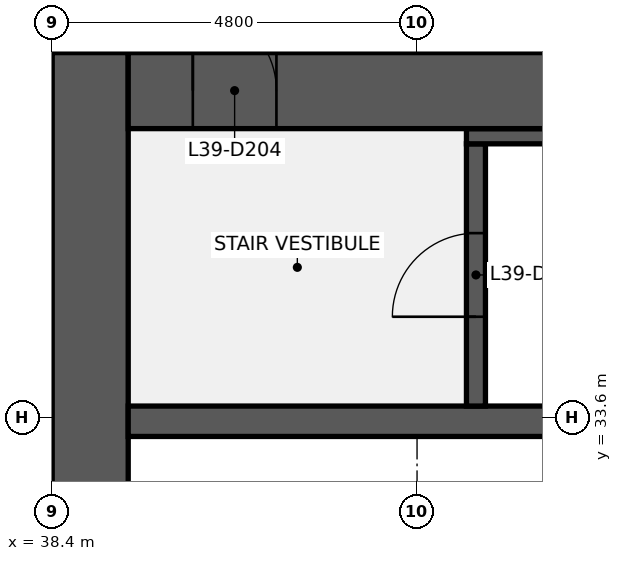
"""IFC4 building model, lengths in metres.
Left out: names, types, materials, properties, quantities, classifications, styles, units other than length and angle.
Written with IfcOpenShell. Run it as: python <this file> out.ifc"""

import sys

from ifc_helpers import new_model, si_unit, direction, frame, frame_2d, origin, place, context, subcontext, project, spatial, rectangle, extrude, element, fill, save


model = new_model("IFC4")
c1 = context("Model", 3, precision=1e-05, world=origin(), true_north=direction((0.0, 1.0)))
c2 = subcontext(c1, "Body", "Model", "MODEL_VIEW")
j1 = project(units=[si_unit("LENGTHUNIT", "METRE"), si_unit("PLANEANGLEUNIT", "RADIAN")], contexts=[c1])
p1 = place(None, origin())
s1 = spatial("IfcSite", under=j1, at=p1, CompositionType="ELEMENT")
p2 = place(p1, origin())
s2 = spatial("IfcBuilding", under=s1, at=p2, CompositionType="ELEMENT")
p3 = place(p2, frame((0.0, 0.0, 176.1)))
s3 = spatial("IfcBuildingStorey", under=s2, at=p3, CompositionType="ELEMENT", Elevation=176.1)
p4 = place(p3, frame((38.9, 9.6, 0.0), z_axis=(0.0, 0.0, 1.0), x_axis=(0.0, 1.0, 0.0)))
e1 = element("IfcWall", 1, at=p4, inside=s3, PredefinedType="SHEAR", context=c2, shape_type="SweptSolid", body=[
    extrude(rectangle(XDim=28.8, YDim=1.0, at=frame_2d((14.4, 0.0))), origin(), (0.0, 0.0, 1.0), 4.1),
])
p5 = place(p4, frame((8.7, 0.0, 0.0)))
e2 = element("IfcOpeningElement", 2, at=p5, cuts=e1, PredefinedType="OPENING", context=c2, shape_type="SweptSolid", body=[
    extrude(rectangle(XDim=1.8, YDim=2.1, at=frame_2d((0.9, 1.05))), frame((0.0, 0.51, 0.0), z_axis=(0.0, -1.0, 0.0), x_axis=(1.0, 0.0, 0.0)), (0.0, 0.0, 1.0), 1.02),
])
p6 = place(p4, frame((18.3, 0.0, 0.0)))
e3 = element("IfcOpeningElement", 3, at=p6, cuts=e1, PredefinedType="OPENING", context=c2, shape_type="SweptSolid", body=[
    extrude(rectangle(XDim=1.8, YDim=2.1, at=frame_2d((0.9, 1.05))), frame((0.0, 0.51, 0.0), z_axis=(0.0, -1.0, 0.0), x_axis=(1.0, 0.0, 0.0)), (0.0, 0.0, 1.0), 1.02),
])
p7 = place(p3, frame((39.4, 33.55, 0.0), z_axis=(0.0, 0.0, 1.0), x_axis=(1.0, 0.0, 0.0)))
e4 = element("IfcWall", 4, at=p7, inside=s3, PredefinedType="SHEAR", context=c2, shape_type="SweptSolid", body=[
    extrude(rectangle(XDim=17.2, YDim=0.4, at=frame_2d((8.6, 0.0))), origin(), (0.0, 0.0, 1.0), 4.1),
])
p8 = place(p3, frame((43.975, 33.75, 0.0), z_axis=(0.0, 0.0, 1.0), x_axis=(0.0, 1.0, 0.0)))
e5 = element("IfcWall", 5, at=p8, inside=s3, PredefinedType="SHEAR", context=c2, shape_type="SweptSolid", body=[
    extrude(rectangle(XDim=3.45, YDim=0.25, at=frame_2d((1.725, 0.0))), origin(), (0.0, 0.0, 1.0), 4.1),
])
p9 = place(p8, frame((1.175, 0.0, 0.0)))
e6 = element("IfcOpeningElement", 6, at=p9, cuts=e5, PredefinedType="OPENING", context=c2, shape_type="SweptSolid", body=[
    extrude(rectangle(XDim=1.1, YDim=2.1, at=frame_2d((0.55, 1.05))), frame((0.0, 0.135, 0.0), z_axis=(0.0, -1.0, 0.0), x_axis=(1.0, 0.0, 0.0)), (0.0, 0.0, 1.0), 0.27),
])
p10 = place(p3, frame((43.85, 37.3, 0.0), z_axis=(0.0, 0.0, 1.0), x_axis=(1.0, 0.0, 0.0)))
e7 = element("IfcWall", 7, at=p10, inside=s3, PredefinedType="SHEAR", context=c2, shape_type="SweptSolid", body=[
    extrude(rectangle(XDim=4.15, YDim=0.2, at=frame_2d((2.075, 0.0))), origin(), (0.0, 0.0, 1.0), 4.1),
])
p11 = place(p3, frame((39.4, 37.9, 0.0), z_axis=(0.0, 0.0, 1.0), x_axis=(1.0, 0.0, 0.0)))
e8 = element("IfcWall", 8, at=p11, inside=s3, PredefinedType="SHEAR", context=c2, shape_type="SweptSolid", body=[
    extrude(rectangle(XDim=8.6, YDim=1.0, at=frame_2d((4.3, 0.0))), origin(), (0.0, 0.0, 1.0), 4.1),
])
p12 = place(p11, frame((0.85, 0.0, 0.0)))
e9 = element("IfcOpeningElement", 9, at=p12, cuts=e8, PredefinedType="OPENING", context=c2, shape_type="SweptSolid", body=[
    extrude(rectangle(XDim=1.1, YDim=2.1, at=frame_2d((0.55, 1.05))), frame((0.0, 0.51, 0.0), z_axis=(0.0, -1.0, 0.0), x_axis=(1.0, 0.0, 0.0)), (0.0, 0.0, 1.0), 1.02),
])
p13 = place(p9, origin())
e10 = element("IfcDoor", 10, at=p13, inside=s3, OperationType="SINGLE_SWING_LEFT", PredefinedType="DOOR", context=c2, shape_type="SweptSolid", body=[
    extrude(rectangle(XDim=1.1, YDim=2.1, at=frame_2d((0.55, 1.05))), frame((0.0, 0.025, 0.0), z_axis=(0.0, -1.0, 0.0), x_axis=(1.0, 0.0, 0.0)), (0.0, 0.0, 1.0), 0.05),
])
fill(e6, e10)
p14 = place(p12, origin())
e11 = element("IfcDoor", 11, at=p14, inside=s3, OperationType="SINGLE_SWING_LEFT", PredefinedType="DOOR", context=c2, shape_type="SweptSolid", body=[
    extrude(rectangle(XDim=1.1, YDim=2.1, at=frame_2d((0.55, 1.05))), frame((0.0, 0.025, 0.0), z_axis=(0.0, -1.0, 0.0), x_axis=(1.0, 0.0, 0.0)), (0.0, 0.0, 1.0), 0.05),
])
fill(e9, e11)
save(model, sys.argv[1])
